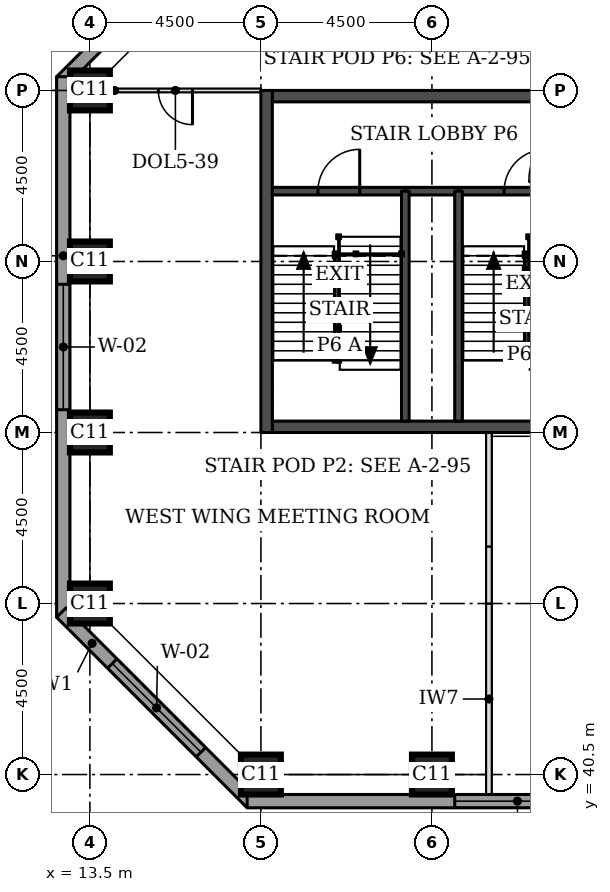
"""IFC4 building model, lengths in metres.
Left out: names, types, materials, properties, quantities, classifications, styles, units other than length and angle.
Written with IfcOpenShell. Run it as: python <this file> out.ifc"""

import sys

from ifc_helpers import new_model, si_unit, direction, frame, frame_2d, origin, origin_2d, place, context, subcontext, project, spatial, rectangle, extrude, element, fill, save


model = new_model("IFC4")
c1 = context("Model", 3, precision=1e-05, world=origin(), true_north=direction((0.0, 1.0)))
c2 = subcontext(c1, "Body", "Model", "MODEL_VIEW")
j1 = project(units=[si_unit("LENGTHUNIT", "METRE"), si_unit("PLANEANGLEUNIT", "RADIAN")], contexts=[c1])
p1 = place(None, origin())
s1 = spatial("IfcSite", under=j1, at=p1, CompositionType="ELEMENT")
p2 = place(p1, origin())
s2 = spatial("IfcBuilding", under=s1, at=p2, CompositionType="ELEMENT")
p3 = place(p2, frame((0.0, 0.0, 112.2)))
s3 = spatial("IfcBuildingStorey", under=s2, at=p3, CompositionType="ELEMENT", Elevation=112.2)
for number, where, z_axis, x_axis in (
    (1, (18.0, 40.5, 0.0), (0.0, 0.0, 1.0), (1.0, 0.0, 0.0)),
    (2, (22.5, 40.5, 0.0), (0.0, 0.0, 1.0), (1.0, 0.0, 0.0)),
    (3, (13.5, 45.0, 0.0), (0.0, 0.0, 1.0), (1.0, 0.0, 0.0)),
    (4, (13.5, 49.5, 0.0), (0.0, 0.0, 1.0), (1.0, 0.0, 0.0)),
    (5, (13.5, 54.0, 0.0), (0.0, 0.0, 1.0), (1.0, 0.0, 0.0)),
    (6, (13.5, 58.5, 0.0), (0.0, 0.0, 1.0), (1.0, 0.0, 0.0)),
):
    element("IfcColumn", number, at=place(p3, frame(where, z_axis=z_axis, x_axis=x_axis)), inside=s3, PredefinedType="COLUMN", context=c2, shape_type="SweptSolid", body=[
        extrude(rectangle(XDim=1.05, YDim=1.05, at=origin_2d()), origin(), (0.0, 0.0, 1.0), 3.7),
    ])
for number, where, z_axis, x_axis in (
    (7, (18.3, 49.65, 0.0), (0.0, 0.0, 1.0), (1.0, 0.0, 0.0)),
    (8, (18.3, 58.35, 0.0), (0.0, 0.0, 1.0), (1.0, 0.0, 0.0)),
):
    element("IfcWall", number, at=place(p3, frame(where, z_axis=z_axis, x_axis=x_axis)), inside=s3, PredefinedType="SHEAR", context=c2, shape_type="SweptSolid", body=[
        extrude(rectangle(XDim=8.4, YDim=0.3, at=frame_2d((4.2, 0.0))), origin(), (0.0, 0.0, 1.0), 3.7),
    ])
p4 = place(p3, frame((18.15, 49.5, 0.0), z_axis=(0.0, 0.0, 1.0), x_axis=(0.0, 1.0, 0.0)))
e9 = element("IfcWall", 9, at=p4, inside=s3, PredefinedType="SHEAR", context=c2, shape_type="SweptSolid", body=[
    extrude(rectangle(XDim=9.0, YDim=0.3, at=frame_2d((4.5, 0.0))), origin(), (0.0, 0.0, 1.0), 3.7),
])
p5 = place(p3, frame((17.761, 63.751, 0.0), z_axis=(0.0, 0.0, 1.0), x_axis=(-0.707106781187, -0.707106781187, 0.0)))
e10 = element("IfcWall", 10, at=p5, inside=s3, PredefinedType="STANDARD", context=c2, shape_type="SweptSolid", body=[
    extrude(rectangle(XDim=7.089, YDim=0.35, at=frame_2d((3.544, 0.0))), origin(), (0.0, 0.0, 1.0), 3.525),
])
p6 = place(p5, frame((1.894, 0.0, 0.9)))
e11 = element("IfcOpeningElement", 11, at=p6, cuts=e10, PredefinedType="OPENING", context=c2, shape_type="SweptSolid", body=[
    extrude(rectangle(XDim=3.3, YDim=1.9, at=frame_2d((1.65, 0.95))), frame((0.0, 0.185, 0.0), z_axis=(0.0, -1.0, 0.0), x_axis=(1.0, 0.0, 0.0)), (0.0, 0.0, 1.0), 0.37),
])
p7 = place(p3, frame((12.8, 58.862, 0.0), z_axis=(0.0, 0.0, 1.0), x_axis=(0.0, -1.0, 0.0)))
e12 = element("IfcWall", 12, at=p7, inside=s3, PredefinedType="STANDARD", context=c2, shape_type="SweptSolid", body=[
    extrude(rectangle(XDim=14.225, YDim=0.35, at=frame_2d((7.112, 0.0))), origin(), (0.0, 0.0, 1.0), 3.525),
])
p8 = place(p7, frame((5.462, 0.0, 0.9)))
e13 = element("IfcOpeningElement", 13, at=p8, cuts=e12, PredefinedType="OPENING", context=c2, shape_type="SweptSolid", body=[
    extrude(rectangle(XDim=3.3, YDim=1.9, at=frame_2d((1.65, 0.95))), frame((0.0, 0.185, 0.0), z_axis=(0.0, -1.0, 0.0), x_axis=(1.0, 0.0, 0.0)), (0.0, 0.0, 1.0), 0.37),
])
p9 = place(p3, frame((12.749, 44.761, 0.0), z_axis=(0.0, 0.0, 1.0), x_axis=(0.707106781187, -0.707106781187, 0.0)))
e14 = element("IfcWall", 14, at=p9, inside=s3, PredefinedType="STANDARD", context=c2, shape_type="SweptSolid", body=[
    extrude(rectangle(XDim=7.089, YDim=0.35, at=frame_2d((3.544, 0.0))), origin(), (0.0, 0.0, 1.0), 3.525),
])
p10 = place(p9, frame((1.894, 0.0, 0.9)))
e15 = element("IfcOpeningElement", 15, at=p10, cuts=e14, PredefinedType="OPENING", context=c2, shape_type="SweptSolid", body=[
    extrude(rectangle(XDim=3.3, YDim=1.9, at=frame_2d((1.65, 0.95))), frame((0.0, 0.185, 0.0), z_axis=(0.0, -1.0, 0.0), x_axis=(1.0, 0.0, 0.0)), (0.0, 0.0, 1.0), 0.37),
])
p11 = place(p3, frame((17.638, 39.8, 0.0), z_axis=(0.0, 0.0, 1.0), x_axis=(1.0, 0.0, 0.0)))
e16 = element("IfcWall", 16, at=p11, inside=s3, PredefinedType="STANDARD", context=c2, shape_type="SweptSolid", body=[
    extrude(rectangle(XDim=17.837, YDim=0.35, at=frame_2d((8.919, 0.0))), origin(), (0.0, 0.0, 1.0), 3.525),
])
p12 = place(p11, frame((5.462, 0.0, 0.9)))
e17 = element("IfcOpeningElement", 17, at=p12, cuts=e16, PredefinedType="OPENING", context=c2, shape_type="SweptSolid", body=[
    extrude(rectangle(XDim=3.3, YDim=1.9, at=frame_2d((1.65, 0.95))), frame((0.0, 0.185, 0.0), z_axis=(0.0, -1.0, 0.0), x_axis=(1.0, 0.0, 0.0)), (0.0, 0.0, 1.0), 0.37),
])
p13 = place(p11, frame((14.037, 0.0, 0.9)))
e18 = element("IfcOpeningElement", 18, at=p13, cuts=e16, PredefinedType="OPENING", context=c2, shape_type="SweptSolid", body=[
    extrude(rectangle(XDim=3.3, YDim=1.9, at=frame_2d((1.65, 0.95))), frame((0.0, 0.185, 0.0), z_axis=(0.0, -1.0, 0.0), x_axis=(1.0, 0.0, 0.0)), (0.0, 0.0, 1.0), 0.37),
])
p14 = place(p3, frame((24.0, 39.975, 0.0), z_axis=(0.0, 0.0, 1.0), x_axis=(0.0, 1.0, 0.0)))
e19 = element("IfcWall", 19, at=p14, inside=s3, PredefinedType="PARTITIONING", context=c2, shape_type="SweptSolid", body=[
    extrude(rectangle(XDim=5.025, YDim=0.15, at=frame_2d((2.512, 0.0))), origin(), (0.0, 0.0, 1.0), 3.55),
])
p15 = place(p3, frame((24.0, 45.0, 0.0), z_axis=(0.0, 0.0, 1.0), x_axis=(0.0, 1.0, 0.0)))
e20 = element("IfcWall", 20, at=p15, inside=s3, PredefinedType="PARTITIONING", context=c2, shape_type="SweptSolid", body=[
    extrude(rectangle(XDim=1.5, YDim=0.15, at=frame_2d((0.75, 0.0))), origin(), (0.0, 0.0, 1.0), 3.55),
])
p16 = place(p3, frame((24.0, 46.5, 0.0), z_axis=(0.0, 0.0, 1.0), x_axis=(0.0, 1.0, 0.0)))
e21 = element("IfcWall", 21, at=p16, inside=s3, PredefinedType="PARTITIONING", context=c2, shape_type="SweptSolid", body=[
    extrude(rectangle(XDim=3.0, YDim=0.15, at=frame_2d((1.5, 0.0))), origin(), (0.0, 0.0, 1.0), 3.55),
])
p17 = place(p3, frame((13.5, 58.5, 0.0), z_axis=(0.0, 0.0, 1.0), x_axis=(1.0, 0.0, 0.0)))
e22 = element("IfcWall", 22, at=p17, inside=s3, PredefinedType="PARTITIONING", context=c2, shape_type="SweptSolid", body=[
    extrude(rectangle(XDim=4.5, YDim=0.1, at=frame_2d((2.25, 0.0))), origin(), (0.0, 0.0, 1.0), 2.55),
])
p18 = place(p17, frame((1.8, 0.0, 0.0)))
e23 = element("IfcOpeningElement", 23, at=p18, cuts=e22, PredefinedType="OPENING", context=c2, shape_type="SweptSolid", body=[
    extrude(rectangle(XDim=0.9, YDim=2.1, at=frame_2d((0.45, 1.05))), frame((0.0, 0.06, 0.0), z_axis=(0.0, -1.0, 0.0), x_axis=(1.0, 0.0, 0.0)), (0.0, 0.0, 1.0), 0.12),
])
p19 = place(p3, frame((21.8, 55.85, 0.0), z_axis=(0.0, 0.0, 1.0), x_axis=(1.0, 0.0, 0.0)))
e24 = element("IfcWall", 24, at=p19, inside=s3, PredefinedType="SOLIDWALL", context=c2, shape_type="SweptSolid", body=[
    extrude(rectangle(XDim=1.4, YDim=0.2, at=frame_2d((0.7, 0.0))), origin(), (0.0, 0.0, 1.0), 3.55),
])
p20 = place(p3, frame((18.3, 55.85, 0.0), z_axis=(0.0, 0.0, 1.0), x_axis=(1.0, 0.0, 0.0)))
e25 = element("IfcWall", 25, at=p20, inside=s3, PredefinedType="SOLIDWALL", context=c2, shape_type="SweptSolid", body=[
    extrude(rectangle(XDim=3.5, YDim=0.2, at=frame_2d((1.75, 0.0))), origin(), (0.0, 0.0, 1.0), 3.55),
])
p21 = place(p20, frame((1.2, 0.0, 0.0)))
e26 = element("IfcOpeningElement", 26, at=p21, cuts=e25, PredefinedType="OPENING", context=c2, shape_type="SweptSolid", body=[
    extrude(rectangle(XDim=1.1, YDim=2.1, at=frame_2d((0.55, 1.05))), frame((0.0, 0.11, 0.0), z_axis=(0.0, -1.0, 0.0), x_axis=(1.0, 0.0, 0.0)), (0.0, 0.0, 1.0), 0.22),
])
p22 = place(p3, frame((23.2, 55.85, 0.0), z_axis=(0.0, 0.0, 1.0), x_axis=(1.0, 0.0, 0.0)))
e27 = element("IfcWall", 27, at=p22, inside=s3, PredefinedType="SOLIDWALL", context=c2, shape_type="SweptSolid", body=[
    extrude(rectangle(XDim=3.5, YDim=0.2, at=frame_2d((1.75, 0.0))), origin(), (0.0, 0.0, 1.0), 3.55),
])
p23 = place(p22, frame((1.2, 0.0, 0.0)))
e28 = element("IfcOpeningElement", 28, at=p23, cuts=e27, PredefinedType="OPENING", context=c2, shape_type="SweptSolid", body=[
    extrude(rectangle(XDim=1.1, YDim=2.1, at=frame_2d((0.55, 1.05))), frame((0.0, 0.11, 0.0), z_axis=(0.0, -1.0, 0.0), x_axis=(1.0, 0.0, 0.0)), (0.0, 0.0, 1.0), 0.22),
])
for number, where, z_axis, x_axis in (
    (29, (21.8, 49.8, 0.0), (0.0, 0.0, 1.0), (0.0, 1.0, 0.0)),
    (30, (23.2, 49.8, 0.0), (0.0, 0.0, 1.0), (0.0, 1.0, 0.0)),
):
    element("IfcWall", number, at=place(p3, frame(where, z_axis=z_axis, x_axis=x_axis)), inside=s3, PredefinedType="SOLIDWALL", context=c2, shape_type="SweptSolid", body=[
        extrude(rectangle(XDim=6.05, YDim=0.2, at=frame_2d((3.025, 0.0))), origin(), (0.0, 0.0, 1.0), 3.55),
    ])
p24 = place(p8, origin())
e31 = element("IfcWindow", 31, at=p24, inside=s3, PartitioningType="SINGLE_PANEL", PredefinedType="WINDOW", context=c2, shape_type="SweptSolid", body=[
    extrude(rectangle(XDim=3.3, YDim=1.9, at=frame_2d((1.65, 0.95))), frame((0.0, 0.085, 0.0), z_axis=(0.0, -1.0, 0.0), x_axis=(1.0, 0.0, 0.0)), (0.0, 0.0, 1.0), 0.06),
])
fill(e13, e31)
p25 = place(p10, origin())
e32 = element("IfcWindow", 32, at=p25, inside=s3, PartitioningType="SINGLE_PANEL", PredefinedType="WINDOW", context=c2, shape_type="SweptSolid", body=[
    extrude(rectangle(XDim=3.3, YDim=1.9, at=frame_2d((1.65, 0.95))), frame((0.0, 0.085, 0.0), z_axis=(0.0, -1.0, 0.0), x_axis=(1.0, 0.0, 0.0)), (0.0, 0.0, 1.0), 0.06),
])
fill(e15, e32)
p26 = place(p12, origin())
e33 = element("IfcWindow", 33, at=p26, inside=s3, PartitioningType="SINGLE_PANEL", PredefinedType="WINDOW", context=c2, shape_type="SweptSolid", body=[
    extrude(rectangle(XDim=3.3, YDim=1.9, at=frame_2d((1.65, 0.95))), frame((0.0, 0.085, 0.0), z_axis=(0.0, -1.0, 0.0), x_axis=(1.0, 0.0, 0.0)), (0.0, 0.0, 1.0), 0.06),
])
fill(e17, e33)
p27 = place(p18, frame((0.9, 0.0, 0.0), z_axis=(0.0, 0.0, 1.0), x_axis=(-1.0, 0.0, 0.0)))
e34 = element("IfcDoor", 34, at=p27, inside=s3, OperationType="SINGLE_SWING_LEFT", PredefinedType="DOOR", context=c2, shape_type="SweptSolid", body=[
    extrude(rectangle(XDim=0.9, YDim=2.1, at=frame_2d((0.45, 1.05))), frame((0.0, 0.025, 0.0), z_axis=(0.0, -1.0, 0.0), x_axis=(1.0, 0.0, 0.0)), (0.0, 0.0, 1.0), 0.05),
])
fill(e23, e34)
p28 = place(p21, origin())
e35 = element("IfcDoor", 35, at=p28, inside=s3, OperationType="SINGLE_SWING_RIGHT", PredefinedType="DOOR", context=c2, shape_type="SweptSolid", body=[
    extrude(rectangle(XDim=1.1, YDim=2.1, at=frame_2d((0.55, 1.05))), frame((0.0, 0.025, 0.0), z_axis=(0.0, -1.0, 0.0), x_axis=(1.0, 0.0, 0.0)), (0.0, 0.0, 1.0), 0.05),
])
fill(e26, e35)
p29 = place(p23, origin())
e36 = element("IfcDoor", 36, at=p29, inside=s3, OperationType="SINGLE_SWING_RIGHT", PredefinedType="DOOR", context=c2, shape_type="SweptSolid", body=[
    extrude(rectangle(XDim=1.1, YDim=2.1, at=frame_2d((0.55, 1.05))), frame((0.0, 0.025, 0.0), z_axis=(0.0, -1.0, 0.0), x_axis=(1.0, 0.0, 0.0)), (0.0, 0.0, 1.0), 0.05),
])
fill(e28, e36)
save(model, sys.argv[1])
